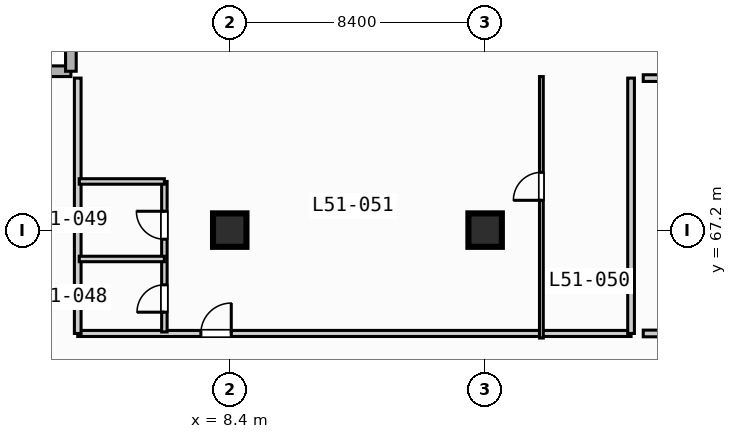
"""IFC4 building model, lengths in metres.
Left out: names, types, materials, properties, quantities, classifications, styles, units other than length and angle.
Written with IfcOpenShell. Run it as: python <this file> out.ifc"""

import sys

from ifc_helpers import new_model, si_unit, direction, frame, frame_2d, origin, origin_2d, place, context, subcontext, project, spatial, rectangle, extrude, element, fill, save


model = new_model("IFC4")
c1 = context("Model", 3, precision=1e-05, world=origin(), true_north=direction((0.0, 1.0)))
c2 = subcontext(c1, "Body", "Model", "MODEL_VIEW")
j1 = project(units=[si_unit("LENGTHUNIT", "METRE"), si_unit("PLANEANGLEUNIT", "RADIAN")], contexts=[c1])
p1 = place(None, origin())
s1 = spatial("IfcSite", under=j1, at=p1, CompositionType="ELEMENT")
p2 = place(p1, origin())
s2 = spatial("IfcBuilding", under=s1, at=p2, CompositionType="ELEMENT")
p3 = place(p2, frame((0.0, 0.0, 208.7)))
s3 = spatial("IfcBuildingStorey", under=s2, at=p3, CompositionType="ELEMENT", Elevation=208.7)
for number, where, z_axis, x_axis in (
    (1, (8.4, 67.2, 0.0), (0.0, 0.0, 1.0), (1.0, 0.0, 0.0)),
    (2, (16.8, 67.2, 0.0), (0.0, 0.0, 1.0), (1.0, 0.0, 0.0)),
):
    element("IfcColumn", number, at=place(p3, frame(where, z_axis=z_axis, x_axis=x_axis)), inside=s3, PredefinedType="COLUMN", context=c2, shape_type="SweptSolid", body=[
        extrude(rectangle(XDim=1.1, YDim=1.1, at=origin_2d()), origin(), (0.0, 0.0, 1.0), 3.7),
    ])
for number, where, z_axis, x_axis in (
    (3, (0.175, 72.425, 0.0), (0.0, 0.0, 1.0), (1.0, 0.0, 0.0)),
    (4, (3.175, 72.425, 0.0), (0.0, 0.0, 1.0), (0.0, 1.0, 0.0)),
):
    element("IfcWall", number, at=place(p3, frame(where, z_axis=z_axis, x_axis=x_axis)), inside=s3, PredefinedType="STANDARD", context=c2, shape_type="SweptSolid", body=[
        extrude(rectangle(XDim=3.0, YDim=0.35, at=frame_2d((1.5, 0.0))), origin(), (0.0, 0.0, 1.0), 3.47),
    ])
p4 = place(p3, frame((3.4, 63.8, 0.0), z_axis=(0.0, 0.0, 1.0), x_axis=(1.0, 0.0, 0.0)))
e5 = element("IfcWall", 5, at=p4, inside=s3, PredefinedType="PARTITIONING", context=c2, shape_type="SweptSolid", body=[
    extrude(rectangle(XDim=18.2, YDim=0.2, at=frame_2d((9.1, 0.0))), origin(), (0.0, 0.0, 1.0), 3.47),
])
p5 = place(p4, frame((4.05, 0.0, 0.0)))
e6 = element("IfcOpeningElement", 6, at=p5, cuts=e5, PredefinedType="OPENING", context=c2, shape_type="SweptSolid", body=[
    extrude(rectangle(XDim=1.0, YDim=2.15, at=frame_2d((0.5, 1.075))), frame((0.0, 0.11, 0.0), z_axis=(0.0, -1.0, 0.0), x_axis=(1.0, 0.0, 0.0)), (0.0, 0.0, 1.0), 0.22),
])
for number, where, z_axis, x_axis in (
    (7, (21.6, 63.8, 0.0), (0.0, 0.0, 1.0), (0.0, 1.0, 0.0)),
    (8, (3.4, 63.8, 0.0), (0.0, 0.0, 1.0), (0.0, 1.0, 0.0)),
):
    element("IfcWall", number, at=place(p3, frame(where, z_axis=z_axis, x_axis=x_axis)), inside=s3, PredefinedType="PARTITIONING", context=c2, shape_type="SweptSolid", body=[
        extrude(rectangle(XDim=8.4, YDim=0.22, at=frame_2d((4.2, 0.0))), origin(), (0.0, 0.0, 1.0), 3.47),
    ])
p6 = place(p3, frame((6.25, 63.85, 0.0), z_axis=(0.0, 0.0, 1.0), x_axis=(0.0, 1.0, 0.0)))
e9 = element("IfcWall", 9, at=p6, inside=s3, PredefinedType="PLUMBINGWALL", context=c2, shape_type="SweptSolid", body=[
    extrude(rectangle(XDim=4.95, YDim=0.18, at=frame_2d((2.475, 0.0))), origin(), (0.0, 0.0, 1.0), 3.47),
])
p7 = place(p6, frame((0.65, 0.0, 0.0)))
e10 = element("IfcOpeningElement", 10, at=p7, cuts=e9, PredefinedType="OPENING", context=c2, shape_type="SweptSolid", body=[
    extrude(rectangle(XDim=0.9, YDim=2.1, at=frame_2d((0.45, 1.05))), frame((0.0, 0.1, 0.0), z_axis=(0.0, -1.0, 0.0), x_axis=(1.0, 0.0, 0.0)), (0.0, 0.0, 1.0), 0.2),
])
p8 = place(p6, frame((3.05, 0.0, 0.0)))
e11 = element("IfcOpeningElement", 11, at=p8, cuts=e9, PredefinedType="OPENING", context=c2, shape_type="SweptSolid", body=[
    extrude(rectangle(XDim=0.92, YDim=2.1, at=frame_2d((0.46, 1.05))), frame((0.0, 0.1, 0.0), z_axis=(0.0, -1.0, 0.0), x_axis=(1.0, 0.0, 0.0)), (0.0, 0.0, 1.0), 0.2),
])
for number, where, z_axis, x_axis in (
    (12, (3.45, 66.25, 0.0), (0.0, 0.0, 1.0), (1.0, 0.0, 0.0)),
    (13, (3.45, 68.8, 0.0), (0.0, 0.0, 1.0), (1.0, 0.0, 0.0)),
):
    element("IfcWall", number, at=place(p3, frame(where, z_axis=z_axis, x_axis=x_axis)), inside=s3, PredefinedType="PLUMBINGWALL", context=c2, shape_type="SweptSolid", body=[
        extrude(rectangle(XDim=2.8, YDim=0.18, at=frame_2d((1.4, 0.0))), origin(), (0.0, 0.0, 1.0), 3.47),
    ])
p9 = place(p3, frame((18.65, 63.65, 0.0), z_axis=(0.0, 0.0, 1.0), x_axis=(0.0, 1.0, 0.0)))
e14 = element("IfcWall", 14, at=p9, inside=s3, PredefinedType="PARTITIONING", context=c2, shape_type="SweptSolid", body=[
    extrude(rectangle(XDim=8.6, YDim=0.125, at=frame_2d((4.3, 0.0))), origin(), (0.0, 0.0, 1.0), 3.47),
])
p10 = place(p9, frame((4.53, 0.0, 0.0)))
e15 = element("IfcOpeningElement", 15, at=p10, cuts=e14, PredefinedType="OPENING", context=c2, shape_type="SweptSolid", body=[
    extrude(rectangle(XDim=0.92, YDim=2.1, at=frame_2d((0.46, 1.05))), frame((0.0, 0.073, 0.0), z_axis=(0.0, -1.0, 0.0), x_axis=(1.0, 0.0, 0.0)), (0.0, 0.0, 1.0), 0.145),
])
p11 = place(p3, frame((22.0, 72.2, 0.0), z_axis=(0.0, 0.0, 1.0), x_axis=(1.0, 0.0, 0.0)))
e16 = element("IfcWall", 16, at=p11, inside=s3, PredefinedType="PARTITIONING", context=c2, shape_type="SweptSolid", body=[
    extrude(rectangle(XDim=11.3, YDim=0.22, at=frame_2d((5.65, 0.0))), origin(), (0.0, 0.0, 1.0), 3.47),
])
p12 = place(p3, frame((22.0, 63.8, 0.0), z_axis=(0.0, 0.0, 1.0), x_axis=(1.0, 0.0, 0.0)))
e17 = element("IfcWall", 17, at=p12, inside=s3, PredefinedType="PARTITIONING", context=c2, shape_type="SweptSolid", body=[
    extrude(rectangle(XDim=6.0, YDim=0.22, at=frame_2d((3.0, 0.0))), origin(), (0.0, 0.0, 1.0), 3.47),
])
p13 = place(p5, origin())
e18 = element("IfcDoor", 18, at=p13, inside=s3, OperationType="SINGLE_SWING_RIGHT", PredefinedType="DOOR", context=c2, shape_type="SweptSolid", body=[
    extrude(rectangle(XDim=1.0, YDim=2.15, at=frame_2d((0.5, 1.075))), frame((0.0, 0.025, 0.0), z_axis=(0.0, -1.0, 0.0), x_axis=(1.0, 0.0, 0.0)), (0.0, 0.0, 1.0), 0.05),
])
fill(e6, e18)
p14 = place(p7, origin())
e19 = element("IfcDoor", 19, at=p14, inside=s3, OperationType="SINGLE_SWING_LEFT", PredefinedType="DOOR", context=c2, shape_type="SweptSolid", body=[
    extrude(rectangle(XDim=0.9, YDim=2.1, at=frame_2d((0.45, 1.05))), frame((0.0, 0.025, 0.0), z_axis=(0.0, -1.0, 0.0), x_axis=(1.0, 0.0, 0.0)), (0.0, 0.0, 1.0), 0.05),
])
fill(e10, e19)
p15 = place(p8, origin())
e20 = element("IfcDoor", 20, at=p15, inside=s3, OperationType="SINGLE_SWING_RIGHT", PredefinedType="DOOR", context=c2, shape_type="SweptSolid", body=[
    extrude(rectangle(XDim=0.92, YDim=2.1, at=frame_2d((0.46, 1.05))), frame((0.0, 0.025, 0.0), z_axis=(0.0, -1.0, 0.0), x_axis=(1.0, 0.0, 0.0)), (0.0, 0.0, 1.0), 0.05),
])
fill(e11, e20)
p16 = place(p10, origin())
e21 = element("IfcDoor", 21, at=p16, inside=s3, OperationType="SINGLE_SWING_LEFT", PredefinedType="DOOR", context=c2, shape_type="SweptSolid", body=[
    extrude(rectangle(XDim=0.92, YDim=2.1, at=frame_2d((0.46, 1.05))), frame((0.0, 0.025, 0.0), z_axis=(0.0, -1.0, 0.0), x_axis=(1.0, 0.0, 0.0)), (0.0, 0.0, 1.0), 0.05),
])
fill(e15, e21)
save(model, sys.argv[1])
